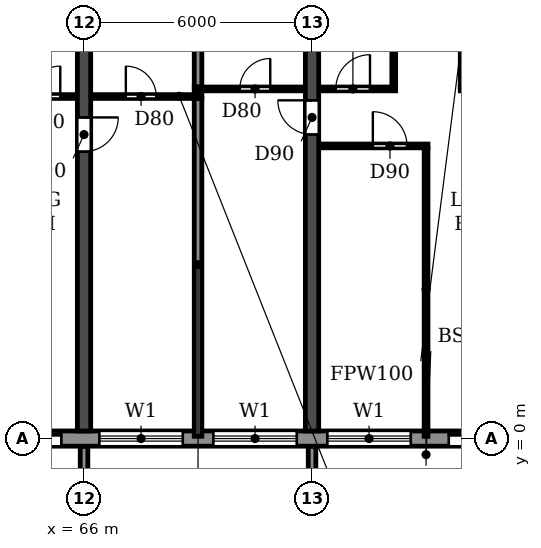
"""IFC4 building model, lengths in metres.
Left out: names, types, materials, properties, quantities, classifications, styles, units other than length and angle.
Written with IfcOpenShell. Run it as: python <this file> out.ifc"""

import sys

from ifc_helpers import new_model, si_unit, direction, frame, frame_2d, origin, place, context, subcontext, project, spatial, polyline, rectangle, outline, extrude, source, transform, mapped, element, fill, save


model = new_model("IFC4")
c1 = context("Model", 3, precision=1e-05, world=origin(), true_north=direction((0.0, 1.0)))
c2 = subcontext(c1, "Body", "Model", "MODEL_VIEW")
j1 = project(units=[si_unit("LENGTHUNIT", "METRE"), si_unit("PLANEANGLEUNIT", "RADIAN")], contexts=[c1])
p1 = place(None, origin())
s1 = spatial("IfcSite", under=j1, at=p1, CompositionType="ELEMENT")
p2 = place(p1, origin())
s2 = spatial("IfcBuilding", under=s1, at=p2, CompositionType="ELEMENT")
p3 = place(p2, frame((0.0, 0.0, 82.8)))
s3 = spatial("IfcBuildingStorey", under=s2, at=p3, CompositionType="ELEMENT", Elevation=82.8)
p4 = place(p3, frame((66.0, 0.2, 0.0), z_axis=(0.0, 0.0, 1.0), x_axis=(0.0, 1.0, 0.0)))
e1 = element("IfcWall", 1, at=p4, inside=s3, PredefinedType="SHEAR", context=c2, shape_type="SweptSolid", body=[
    extrude(rectangle(XDim=11.675, YDim=0.35, at=frame_2d((5.837, 0.0))), origin(), (0.0, 0.0, 1.0), 3.06),
])
p5 = place(p4, frame((7.35, 0.0, 0.0)))
e2 = element("IfcOpeningElement", 2, at=p5, cuts=e1, PredefinedType="OPENING", context=c2, shape_type="SweptSolid", body=[
    extrude(rectangle(XDim=0.9, YDim=2.1, at=frame_2d((0.45, 1.05))), frame((0.0, 0.185, 0.0), z_axis=(0.0, -1.0, 0.0), x_axis=(1.0, 0.0, 0.0)), (0.0, 0.0, 1.0), 0.37),
])
p6 = place(p3, frame((72.0, 0.2, 0.0), z_axis=(0.0, 0.0, 1.0), x_axis=(0.0, 1.0, 0.0)))
e3 = element("IfcWall", 3, at=p6, inside=s3, PredefinedType="SHEAR", context=c2, shape_type="SweptSolid", body=[
    extrude(rectangle(XDim=11.675, YDim=0.35, at=frame_2d((5.837, 0.0))), origin(), (0.0, 0.0, 1.0), 3.06),
])
p7 = place(p6, frame((7.8, 0.0, 0.0)))
e4 = element("IfcOpeningElement", 4, at=p7, cuts=e3, PredefinedType="OPENING", context=c2, shape_type="SweptSolid", body=[
    extrude(rectangle(XDim=0.9, YDim=2.1, at=frame_2d((0.45, 1.05))), frame((0.0, 0.185, 0.0), z_axis=(0.0, -1.0, 0.0), x_axis=(1.0, 0.0, 0.0)), (0.0, 0.0, 1.0), 0.37),
])
p8 = place(p3, frame((10.683, 0.0, 0.0), z_axis=(0.0, 0.0, 1.0), x_axis=(1.0, 0.0, 0.0)))
e5 = element("IfcWall", 5, at=p8, inside=s3, PredefinedType="STANDARD", context=c2, shape_type="SweptSolid", body=[
    extrude(rectangle(XDim=80.634, YDim=0.4, at=frame_2d((40.317, 0.0))), origin(), (0.0, 0.0, 1.0), 3.06),
])
p9 = place(p8, frame((1.717, 0.0, 0.9)))
e6 = element("IfcOpeningElement", 6, at=p9, cuts=e5, PredefinedType="OPENING", context=c2, shape_type="SweptSolid", body=[
    extrude(rectangle(XDim=2.2, YDim=1.5, at=frame_2d((1.1, 0.75))), frame((0.0, 0.21, 0.0), z_axis=(0.0, -1.0, 0.0), x_axis=(1.0, 0.0, 0.0)), (0.0, 0.0, 1.0), 0.42),
])
p10 = place(p8, frame((4.917, 0.0, 0.0)))
e7 = element("IfcOpeningElement", 7, at=p10, cuts=e5, PredefinedType="OPENING", context=c2, shape_type="SweptSolid", body=[
    extrude(rectangle(XDim=1.8, YDim=2.4, at=frame_2d((0.9, 1.2))), frame((0.0, 0.21, 0.0), z_axis=(0.0, -1.0, 0.0), x_axis=(1.0, 0.0, 0.0)), (0.0, 0.0, 1.0), 0.42),
])
p11 = place(p8, frame((7.717, 0.0, 0.9)))
e8 = element("IfcOpeningElement", 8, at=p11, cuts=e5, PredefinedType="OPENING", context=c2, shape_type="SweptSolid", body=[
    extrude(rectangle(XDim=2.2, YDim=1.5, at=frame_2d((1.1, 0.75))), frame((0.0, 0.21, 0.0), z_axis=(0.0, -1.0, 0.0), x_axis=(1.0, 0.0, 0.0)), (0.0, 0.0, 1.0), 0.42),
])
p12 = place(p8, frame((10.717, 0.0, 0.9)))
e9 = element("IfcOpeningElement", 9, at=p12, cuts=e5, PredefinedType="OPENING", context=c2, shape_type="SweptSolid", body=[
    extrude(rectangle(XDim=2.2, YDim=1.5, at=frame_2d((1.1, 0.75))), frame((0.0, 0.21, 0.0), z_axis=(0.0, -1.0, 0.0), x_axis=(1.0, 0.0, 0.0)), (0.0, 0.0, 1.0), 0.42),
])
p13 = place(p8, frame((13.917, 0.0, 0.0)))
e10 = element("IfcOpeningElement", 10, at=p13, cuts=e5, PredefinedType="OPENING", context=c2, shape_type="SweptSolid", body=[
    extrude(rectangle(XDim=1.8, YDim=2.4, at=frame_2d((0.9, 1.2))), frame((0.0, 0.21, 0.0), z_axis=(0.0, -1.0, 0.0), x_axis=(1.0, 0.0, 0.0)), (0.0, 0.0, 1.0), 0.42),
])
p14 = place(p8, frame((16.717, 0.0, 0.9)))
e11 = element("IfcOpeningElement", 11, at=p14, cuts=e5, PredefinedType="OPENING", context=c2, shape_type="SweptSolid", body=[
    extrude(rectangle(XDim=2.2, YDim=1.5, at=frame_2d((1.1, 0.75))), frame((0.0, 0.21, 0.0), z_axis=(0.0, -1.0, 0.0), x_axis=(1.0, 0.0, 0.0)), (0.0, 0.0, 1.0), 0.42),
])
p15 = place(p8, frame((19.717, 0.0, 0.9)))
e12 = element("IfcOpeningElement", 12, at=p15, cuts=e5, PredefinedType="OPENING", context=c2, shape_type="SweptSolid", body=[
    extrude(rectangle(XDim=2.2, YDim=1.5, at=frame_2d((1.1, 0.75))), frame((0.0, 0.21, 0.0), z_axis=(0.0, -1.0, 0.0), x_axis=(1.0, 0.0, 0.0)), (0.0, 0.0, 1.0), 0.42),
])
p16 = place(p8, frame((22.717, 0.0, 0.9)))
e13 = element("IfcOpeningElement", 13, at=p16, cuts=e5, PredefinedType="OPENING", context=c2, shape_type="SweptSolid", body=[
    extrude(rectangle(XDim=2.2, YDim=1.5, at=frame_2d((1.1, 0.75))), frame((0.0, 0.21, 0.0), z_axis=(0.0, -1.0, 0.0), x_axis=(1.0, 0.0, 0.0)), (0.0, 0.0, 1.0), 0.42),
])
p17 = place(p8, frame((25.917, 0.0, 0.0)))
e14 = element("IfcOpeningElement", 14, at=p17, cuts=e5, PredefinedType="OPENING", context=c2, shape_type="SweptSolid", body=[
    extrude(rectangle(XDim=1.8, YDim=2.4, at=frame_2d((0.9, 1.2))), frame((0.0, 0.21, 0.0), z_axis=(0.0, -1.0, 0.0), x_axis=(1.0, 0.0, 0.0)), (0.0, 0.0, 1.0), 0.42),
])
p18 = place(p8, frame((28.717, 0.0, 0.9)))
e15 = element("IfcOpeningElement", 15, at=p18, cuts=e5, PredefinedType="OPENING", context=c2, shape_type="SweptSolid", body=[
    extrude(rectangle(XDim=2.2, YDim=1.5, at=frame_2d((1.1, 0.75))), frame((0.0, 0.21, 0.0), z_axis=(0.0, -1.0, 0.0), x_axis=(1.0, 0.0, 0.0)), (0.0, 0.0, 1.0), 0.42),
])
p19 = place(p8, frame((31.717, 0.0, 0.9)))
e16 = element("IfcOpeningElement", 16, at=p19, cuts=e5, PredefinedType="OPENING", context=c2, shape_type="SweptSolid", body=[
    extrude(rectangle(XDim=2.2, YDim=1.5, at=frame_2d((1.1, 0.75))), frame((0.0, 0.21, 0.0), z_axis=(0.0, -1.0, 0.0), x_axis=(1.0, 0.0, 0.0)), (0.0, 0.0, 1.0), 0.42),
])
p20 = place(p8, frame((34.717, 0.0, 0.9)))
e17 = element("IfcOpeningElement", 17, at=p20, cuts=e5, PredefinedType="OPENING", context=c2, shape_type="SweptSolid", body=[
    extrude(rectangle(XDim=2.2, YDim=1.5, at=frame_2d((1.1, 0.75))), frame((0.0, 0.21, 0.0), z_axis=(0.0, -1.0, 0.0), x_axis=(1.0, 0.0, 0.0)), (0.0, 0.0, 1.0), 0.42),
])
p21 = place(p8, frame((37.717, 0.0, 0.9)))
e18 = element("IfcOpeningElement", 18, at=p21, cuts=e5, PredefinedType="OPENING", context=c2, shape_type="SweptSolid", body=[
    extrude(rectangle(XDim=2.2, YDim=1.5, at=frame_2d((1.1, 0.75))), frame((0.0, 0.21, 0.0), z_axis=(0.0, -1.0, 0.0), x_axis=(1.0, 0.0, 0.0)), (0.0, 0.0, 1.0), 0.42),
])
p22 = place(p8, frame((40.917, 0.0, 0.0)))
e19 = element("IfcOpeningElement", 19, at=p22, cuts=e5, PredefinedType="OPENING", context=c2, shape_type="SweptSolid", body=[
    extrude(rectangle(XDim=1.8, YDim=2.4, at=frame_2d((0.9, 1.2))), frame((0.0, 0.21, 0.0), z_axis=(0.0, -1.0, 0.0), x_axis=(1.0, 0.0, 0.0)), (0.0, 0.0, 1.0), 0.42),
])
p23 = place(p8, frame((43.717, 0.0, 0.9)))
e20 = element("IfcOpeningElement", 20, at=p23, cuts=e5, PredefinedType="OPENING", context=c2, shape_type="SweptSolid", body=[
    extrude(rectangle(XDim=2.2, YDim=1.5, at=frame_2d((1.1, 0.75))), frame((0.0, 0.21, 0.0), z_axis=(0.0, -1.0, 0.0), x_axis=(1.0, 0.0, 0.0)), (0.0, 0.0, 1.0), 0.42),
])
p24 = place(p8, frame((46.717, 0.0, 0.9)))
e21 = element("IfcOpeningElement", 21, at=p24, cuts=e5, PredefinedType="OPENING", context=c2, shape_type="SweptSolid", body=[
    extrude(rectangle(XDim=2.2, YDim=1.5, at=frame_2d((1.1, 0.75))), frame((0.0, 0.21, 0.0), z_axis=(0.0, -1.0, 0.0), x_axis=(1.0, 0.0, 0.0)), (0.0, 0.0, 1.0), 0.42),
])
p25 = place(p8, frame((49.717, 0.0, 0.9)))
e22 = element("IfcOpeningElement", 22, at=p25, cuts=e5, PredefinedType="OPENING", context=c2, shape_type="SweptSolid", body=[
    extrude(rectangle(XDim=2.2, YDim=1.5, at=frame_2d((1.1, 0.75))), frame((0.0, 0.21, 0.0), z_axis=(0.0, -1.0, 0.0), x_axis=(1.0, 0.0, 0.0)), (0.0, 0.0, 1.0), 0.42),
])
p26 = place(p8, frame((52.917, 0.0, 0.0)))
e23 = element("IfcOpeningElement", 23, at=p26, cuts=e5, PredefinedType="OPENING", context=c2, shape_type="SweptSolid", body=[
    extrude(rectangle(XDim=1.8, YDim=2.4, at=frame_2d((0.9, 1.2))), frame((0.0, 0.21, 0.0), z_axis=(0.0, -1.0, 0.0), x_axis=(1.0, 0.0, 0.0)), (0.0, 0.0, 1.0), 0.42),
])
p27 = place(p8, frame((55.717, 0.0, 0.9)))
e24 = element("IfcOpeningElement", 24, at=p27, cuts=e5, PredefinedType="OPENING", context=c2, shape_type="SweptSolid", body=[
    extrude(rectangle(XDim=2.2, YDim=1.5, at=frame_2d((1.1, 0.75))), frame((0.0, 0.21, 0.0), z_axis=(0.0, -1.0, 0.0), x_axis=(1.0, 0.0, 0.0)), (0.0, 0.0, 1.0), 0.42),
])
p28 = place(p8, frame((58.717, 0.0, 0.9)))
e25 = element("IfcOpeningElement", 25, at=p28, cuts=e5, PredefinedType="OPENING", context=c2, shape_type="SweptSolid", body=[
    extrude(rectangle(XDim=2.2, YDim=1.5, at=frame_2d((1.1, 0.75))), frame((0.0, 0.21, 0.0), z_axis=(0.0, -1.0, 0.0), x_axis=(1.0, 0.0, 0.0)), (0.0, 0.0, 1.0), 0.42),
])
p29 = place(p8, frame((61.717, 0.0, 0.9)))
e26 = element("IfcOpeningElement", 26, at=p29, cuts=e5, PredefinedType="OPENING", context=c2, shape_type="SweptSolid", body=[
    extrude(rectangle(XDim=2.2, YDim=1.5, at=frame_2d((1.1, 0.75))), frame((0.0, 0.21, 0.0), z_axis=(0.0, -1.0, 0.0), x_axis=(1.0, 0.0, 0.0)), (0.0, 0.0, 1.0), 0.42),
])
p30 = place(p8, frame((64.917, 0.0, 0.0)))
e27 = element("IfcOpeningElement", 27, at=p30, cuts=e5, PredefinedType="OPENING", context=c2, shape_type="SweptSolid", body=[
    extrude(rectangle(XDim=1.8, YDim=2.4, at=frame_2d((0.9, 1.2))), frame((0.0, 0.21, 0.0), z_axis=(0.0, -1.0, 0.0), x_axis=(1.0, 0.0, 0.0)), (0.0, 0.0, 1.0), 0.42),
])
p31 = place(p8, frame((67.717, 0.0, 0.9)))
e28 = element("IfcOpeningElement", 28, at=p31, cuts=e5, PredefinedType="OPENING", context=c2, shape_type="SweptSolid", body=[
    extrude(rectangle(XDim=2.2, YDim=1.5, at=frame_2d((1.1, 0.75))), frame((0.0, 0.21, 0.0), z_axis=(0.0, -1.0, 0.0), x_axis=(1.0, 0.0, 0.0)), (0.0, 0.0, 1.0), 0.42),
])
p32 = place(p8, frame((70.717, 0.0, 0.9)))
e29 = element("IfcOpeningElement", 29, at=p32, cuts=e5, PredefinedType="OPENING", context=c2, shape_type="SweptSolid", body=[
    extrude(rectangle(XDim=2.2, YDim=1.5, at=frame_2d((1.1, 0.75))), frame((0.0, 0.21, 0.0), z_axis=(0.0, -1.0, 0.0), x_axis=(1.0, 0.0, 0.0)), (0.0, 0.0, 1.0), 0.42),
])
p33 = place(p8, frame((73.917, 0.0, 0.0)))
e30 = element("IfcOpeningElement", 30, at=p33, cuts=e5, PredefinedType="OPENING", context=c2, shape_type="SweptSolid", body=[
    extrude(rectangle(XDim=1.8, YDim=2.4, at=frame_2d((0.9, 1.2))), frame((0.0, 0.21, 0.0), z_axis=(0.0, -1.0, 0.0), x_axis=(1.0, 0.0, 0.0)), (0.0, 0.0, 1.0), 0.42),
])
p34 = place(p8, frame((76.717, 0.0, 0.9)))
e31 = element("IfcOpeningElement", 31, at=p34, cuts=e5, PredefinedType="OPENING", context=c2, shape_type="SweptSolid", body=[
    extrude(rectangle(XDim=2.2, YDim=1.5, at=frame_2d((1.1, 0.75))), frame((0.0, 0.21, 0.0), z_axis=(0.0, -1.0, 0.0), x_axis=(1.0, 0.0, 0.0)), (0.0, 0.0, 1.0), 0.42),
])
m1 = source(origin(), c2, "Body", "SweptSolid", [
    extrude(outline(polyline([(0.0, 0.0), (0.2, 0.0), (0.2, 1.65), (0.0, 1.65), (0.0, 0.0)])), origin(), (0.0, 0.0, 1.0), 3.1),
])
for number, where in (
    (32, (65.9, -1.85, 0.0)),
    (33, (71.9, -1.85, 0.0)),
):
    element("IfcWall", number, at=place(p3, frame(where)), inside=s3, PredefinedType="STANDARD", context=c2, shape_type="MappedRepresentation", body=[
        mapped(m1, transform((0.0, 0.0, 0.0))),
    ])
p35 = place(p3, frame((69.0, 0.06, 0.0), z_axis=(0.0, 0.0, 1.0), x_axis=(0.0, 1.0, 0.0)))
e34 = element("IfcWall", 34, at=p35, inside=s3, PredefinedType="PARTITIONING", context=c2, shape_type="SweptSolid", body=[
    extrude(rectangle(XDim=8.89, YDim=0.2, at=frame_2d((4.445, 0.0))), origin(), (0.0, 0.0, 1.0), 3.06),
])
p36 = place(p3, frame((69.0, 9.25, 0.0), z_axis=(0.0, 0.0, 1.0), x_axis=(0.0, 1.0, 0.0)))
e35 = element("IfcWall", 35, at=p36, inside=s3, PredefinedType="PARTITIONING", context=c2, shape_type="SweptSolid", body=[
    extrude(rectangle(XDim=2.615, YDim=0.2, at=frame_2d((1.308, 0.0))), origin(), (0.0, 0.0, 1.0), 3.06),
])
p37 = place(p3, frame((72.185, 7.7, 0.0), z_axis=(0.0, 0.0, 1.0), x_axis=(1.0, 0.0, 0.0)))
e36 = element("IfcWall", 36, at=p37, inside=s3, PredefinedType="PARTITIONING", context=c2, shape_type="SweptSolid", body=[
    extrude(rectangle(XDim=2.865, YDim=0.1, at=frame_2d((1.433, 0.0))), origin(), (0.0, 0.0, 1.0), 3.06),
])
p38 = place(p37, frame((1.415, 0.0, 0.0)))
e37 = element("IfcOpeningElement", 37, at=p38, cuts=e36, PredefinedType="OPENING", context=c2, shape_type="SweptSolid", body=[
    extrude(rectangle(XDim=0.9, YDim=2.1, at=frame_2d((0.45, 1.05))), frame((0.0, 0.06, 0.0), z_axis=(0.0, -1.0, 0.0), x_axis=(1.0, 0.0, 0.0)), (0.0, 0.0, 1.0), 0.12),
])
p39 = place(p3, frame((63.9, 9.0, 0.0), z_axis=(0.0, 0.0, 1.0), x_axis=(1.0, 0.0, 0.0)))
e38 = element("IfcWall", 38, at=p39, inside=s3, PredefinedType="PARTITIONING", context=c2, shape_type="SweptSolid", body=[
    extrude(rectangle(XDim=1.915, YDim=0.1, at=frame_2d((0.958, 0.0))), origin(), (0.0, 0.0, 1.0), 3.06),
])
p40 = place(p39, frame((0.675, 0.0, 0.0)))
e39 = element("IfcOpeningElement", 39, at=p40, cuts=e38, PredefinedType="OPENING", context=c2, shape_type="SweptSolid", body=[
    extrude(rectangle(XDim=0.8, YDim=2.1, at=frame_2d((0.4, 1.05))), frame((0.0, 0.06, 0.0), z_axis=(0.0, -1.0, 0.0), x_axis=(1.0, 0.0, 0.0)), (0.0, 0.0, 1.0), 0.12),
])
p41 = place(p3, frame((66.185, 9.0, 0.0), z_axis=(0.0, 0.0, 1.0), x_axis=(1.0, 0.0, 0.0)))
e40 = element("IfcWall", 40, at=p41, inside=s3, PredefinedType="PARTITIONING", context=c2, shape_type="SweptSolid", body=[
    extrude(rectangle(XDim=2.915, YDim=0.1, at=frame_2d((1.458, 0.0))), origin(), (0.0, 0.0, 1.0), 3.06),
])
p42 = place(p41, frame((0.915, 0.0, 0.0)))
e41 = element("IfcOpeningElement", 41, at=p42, cuts=e40, PredefinedType="OPENING", context=c2, shape_type="SweptSolid", body=[
    extrude(rectangle(XDim=0.8, YDim=2.1, at=frame_2d((0.4, 1.05))), frame((0.0, 0.06, 0.0), z_axis=(0.0, -1.0, 0.0), x_axis=(1.0, 0.0, 0.0)), (0.0, 0.0, 1.0), 0.12),
])
p43 = place(p3, frame((68.9, 9.2, 0.0), z_axis=(0.0, 0.0, 1.0), x_axis=(1.0, 0.0, 0.0)))
e42 = element("IfcWall", 42, at=p43, inside=s3, PredefinedType="PARTITIONING", context=c2, shape_type="SweptSolid", body=[
    extrude(rectangle(XDim=2.915, YDim=0.1, at=frame_2d((1.458, 0.0))), origin(), (0.0, 0.0, 1.0), 3.06),
])
p44 = place(p43, frame((1.2, 0.0, 0.0)))
e43 = element("IfcOpeningElement", 43, at=p44, cuts=e42, PredefinedType="OPENING", context=c2, shape_type="SweptSolid", body=[
    extrude(rectangle(XDim=0.8, YDim=2.1, at=frame_2d((0.4, 1.05))), frame((0.0, 0.06, 0.0), z_axis=(0.0, -1.0, 0.0), x_axis=(1.0, 0.0, 0.0)), (0.0, 0.0, 1.0), 0.12),
])
p45 = place(p3, frame((72.185, 9.2, 0.0), z_axis=(0.0, 0.0, 1.0), x_axis=(1.0, 0.0, 0.0)))
e44 = element("IfcWall", 44, at=p45, inside=s3, PredefinedType="PARTITIONING", context=c2, shape_type="SweptSolid", body=[
    extrude(rectangle(XDim=2.015, YDim=0.1, at=frame_2d((1.007, 0.0))), origin(), (0.0, 0.0, 1.0), 3.06),
])
p46 = place(p45, frame((0.44, 0.0, 0.0)))
e45 = element("IfcOpeningElement", 45, at=p46, cuts=e44, PredefinedType="OPENING", context=c2, shape_type="SweptSolid", body=[
    extrude(rectangle(XDim=0.9, YDim=2.1, at=frame_2d((0.45, 1.05))), frame((0.0, 0.06, 0.0), z_axis=(0.0, -1.0, 0.0), x_axis=(1.0, 0.0, 0.0)), (0.0, 0.0, 1.0), 0.12),
])
p47 = place(p3, frame((75.9, 9.2, 0.0), z_axis=(0.0, 0.0, 1.0), x_axis=(1.0, 0.0, 0.0)))
e46 = element("IfcWall", 46, at=p47, inside=s3, PredefinedType="PARTITIONING", context=c2, shape_type="SweptSolid", body=[
    extrude(rectangle(XDim=1.915, YDim=0.1, at=frame_2d((0.958, 0.0))), origin(), (0.0, 0.0, 1.0), 3.06),
])
p48 = place(p47, frame((0.675, 0.0, 0.0)))
e47 = element("IfcOpeningElement", 47, at=p48, cuts=e46, PredefinedType="OPENING", context=c2, shape_type="SweptSolid", body=[
    extrude(rectangle(XDim=0.8, YDim=2.1, at=frame_2d((0.4, 1.05))), frame((0.0, 0.06, 0.0), z_axis=(0.0, -1.0, 0.0), x_axis=(1.0, 0.0, 0.0)), (0.0, 0.0, 1.0), 0.12),
])
p49 = place(p3, frame((74.15, 9.25, 0.0), z_axis=(0.0, 0.0, 1.0), x_axis=(0.0, 1.0, 0.0)))
e48 = element("IfcWall", 48, at=p49, inside=s3, PredefinedType="PARTITIONING", context=c2, shape_type="SweptSolid", body=[
    extrude(rectangle(XDim=2.615, YDim=0.1, at=frame_2d((1.308, 0.0))), origin(), (0.0, 0.0, 1.0), 3.06),
])
p50 = place(p3, frame((75.0, 0.06, 0.0), z_axis=(0.0, 0.0, 1.0), x_axis=(0.0, 1.0, 0.0)))
e49 = element("IfcWall", 49, at=p50, inside=s3, PredefinedType="PARTITIONING", context=c2, shape_type="SweptSolid", body=[
    extrude(rectangle(XDim=7.59, YDim=0.1, at=frame_2d((3.795, 0.0))), origin(), (0.0, 0.0, 1.0), 3.06),
])
p51 = place(p3, frame((75.95, 9.25, 0.0), z_axis=(0.0, 0.0, 1.0), x_axis=(0.0, 1.0, 0.0)))
e50 = element("IfcWall", 50, at=p51, inside=s3, PredefinedType="PARTITIONING", context=c2, shape_type="SweptSolid", body=[
    extrude(rectangle(XDim=2.615, YDim=0.1, at=frame_2d((1.308, 0.0))), origin(), (0.0, 0.0, 1.0), 3.06),
])
p52 = place(p26, origin())
e51 = element("IfcDoor", 51, at=p52, inside=s3, OperationType="DOUBLE_DOOR_SLIDING", PredefinedType="DOOR", context=c2, shape_type="SweptSolid", body=[
    extrude(rectangle(XDim=1.8, YDim=2.4, at=frame_2d((0.9, 1.2))), frame((0.0, 0.025, 0.0), z_axis=(0.0, -1.0, 0.0), x_axis=(1.0, 0.0, 0.0)), (0.0, 0.0, 1.0), 0.05),
])
fill(e23, e51)
p53 = place(p27, origin())
e52 = element("IfcWindow", 52, at=p53, inside=s3, PartitioningType="DOUBLE_PANEL_HORIZONTAL", PredefinedType="WINDOW", context=c2, shape_type="SweptSolid", body=[
    extrude(rectangle(XDim=2.2, YDim=1.5, at=frame_2d((1.1, 0.75))), frame((0.0, 0.03, 0.0), z_axis=(0.0, -1.0, 0.0), x_axis=(1.0, 0.0, 0.0)), (0.0, 0.0, 1.0), 0.06),
])
fill(e24, e52)
p54 = place(p28, origin())
e53 = element("IfcWindow", 53, at=p54, inside=s3, PartitioningType="DOUBLE_PANEL_HORIZONTAL", PredefinedType="WINDOW", context=c2, shape_type="SweptSolid", body=[
    extrude(rectangle(XDim=2.2, YDim=1.5, at=frame_2d((1.1, 0.75))), frame((0.0, 0.03, 0.0), z_axis=(0.0, -1.0, 0.0), x_axis=(1.0, 0.0, 0.0)), (0.0, 0.0, 1.0), 0.06),
])
fill(e25, e53)
p55 = place(p29, origin())
e54 = element("IfcWindow", 54, at=p55, inside=s3, PartitioningType="DOUBLE_PANEL_HORIZONTAL", PredefinedType="WINDOW", context=c2, shape_type="SweptSolid", body=[
    extrude(rectangle(XDim=2.2, YDim=1.5, at=frame_2d((1.1, 0.75))), frame((0.0, 0.03, 0.0), z_axis=(0.0, -1.0, 0.0), x_axis=(1.0, 0.0, 0.0)), (0.0, 0.0, 1.0), 0.06),
])
fill(e26, e54)
p56 = place(p30, origin())
e55 = element("IfcDoor", 55, at=p56, inside=s3, OperationType="DOUBLE_DOOR_SLIDING", PredefinedType="DOOR", context=c2, shape_type="SweptSolid", body=[
    extrude(rectangle(XDim=1.8, YDim=2.4, at=frame_2d((0.9, 1.2))), frame((0.0, 0.025, 0.0), z_axis=(0.0, -1.0, 0.0), x_axis=(1.0, 0.0, 0.0)), (0.0, 0.0, 1.0), 0.05),
])
fill(e27, e55)
p57 = place(p42, origin())
e56 = element("IfcDoor", 56, at=p57, inside=s3, OperationType="SINGLE_SWING_LEFT", PredefinedType="DOOR", context=c2, shape_type="SweptSolid", body=[
    extrude(rectangle(XDim=0.8, YDim=2.1, at=frame_2d((0.4, 1.05))), frame((0.0, 0.025, 0.0), z_axis=(0.0, -1.0, 0.0), x_axis=(1.0, 0.0, 0.0)), (0.0, 0.0, 1.0), 0.05),
])
fill(e41, e56)
p58 = place(p40, origin())
e57 = element("IfcDoor", 57, at=p58, inside=s3, OperationType="SINGLE_SWING_RIGHT", PredefinedType="DOOR", context=c2, shape_type="SweptSolid", body=[
    extrude(rectangle(XDim=0.8, YDim=2.1, at=frame_2d((0.4, 1.05))), frame((0.0, 0.025, 0.0), z_axis=(0.0, -1.0, 0.0), x_axis=(1.0, 0.0, 0.0)), (0.0, 0.0, 1.0), 0.05),
])
fill(e39, e57)
p59 = place(p5, frame((0.9, 0.0, 0.0), z_axis=(0.0, 0.0, 1.0), x_axis=(-1.0, 0.0, 0.0)))
e58 = element("IfcDoor", 58, at=p59, inside=s3, OperationType="SINGLE_SWING_LEFT", PredefinedType="DOOR", context=c2, shape_type="SweptSolid", body=[
    extrude(rectangle(XDim=0.9, YDim=2.1, at=frame_2d((0.45, 1.05))), frame((0.0, 0.025, 0.0), z_axis=(0.0, -1.0, 0.0), x_axis=(1.0, 0.0, 0.0)), (0.0, 0.0, 1.0), 0.05),
])
fill(e2, e58)
p60 = place(p44, origin())
e59 = element("IfcDoor", 59, at=p60, inside=s3, OperationType="SINGLE_SWING_RIGHT", PredefinedType="DOOR", context=c2, shape_type="SweptSolid", body=[
    extrude(rectangle(XDim=0.8, YDim=2.1, at=frame_2d((0.4, 1.05))), frame((0.0, 0.025, 0.0), z_axis=(0.0, -1.0, 0.0), x_axis=(1.0, 0.0, 0.0)), (0.0, 0.0, 1.0), 0.05),
])
fill(e43, e59)
p61 = place(p7, origin())
e60 = element("IfcDoor", 60, at=p61, inside=s3, OperationType="SINGLE_SWING_RIGHT", PredefinedType="DOOR", context=c2, shape_type="SweptSolid", body=[
    extrude(rectangle(XDim=0.9, YDim=2.1, at=frame_2d((0.45, 1.05))), frame((0.0, 0.025, 0.0), z_axis=(0.0, -1.0, 0.0), x_axis=(1.0, 0.0, 0.0)), (0.0, 0.0, 1.0), 0.05),
])
fill(e4, e60)
p62 = place(p46, origin())
e61 = element("IfcDoor", 61, at=p62, inside=s3, OperationType="SINGLE_SWING_RIGHT", PredefinedType="DOOR", context=c2, shape_type="SweptSolid", body=[
    extrude(rectangle(XDim=0.9, YDim=2.1, at=frame_2d((0.45, 1.05))), frame((0.0, 0.025, 0.0), z_axis=(0.0, -1.0, 0.0), x_axis=(1.0, 0.0, 0.0)), (0.0, 0.0, 1.0), 0.05),
])
fill(e45, e61)
p63 = place(p38, origin())
e62 = element("IfcDoor", 62, at=p63, inside=s3, OperationType="SINGLE_SWING_LEFT", PredefinedType="DOOR", context=c2, shape_type="SweptSolid", body=[
    extrude(rectangle(XDim=0.9, YDim=2.1, at=frame_2d((0.45, 1.05))), frame((0.0, 0.025, 0.0), z_axis=(0.0, -1.0, 0.0), x_axis=(1.0, 0.0, 0.0)), (0.0, 0.0, 1.0), 0.05),
])
fill(e37, e62)
save(model, sys.argv[1])
